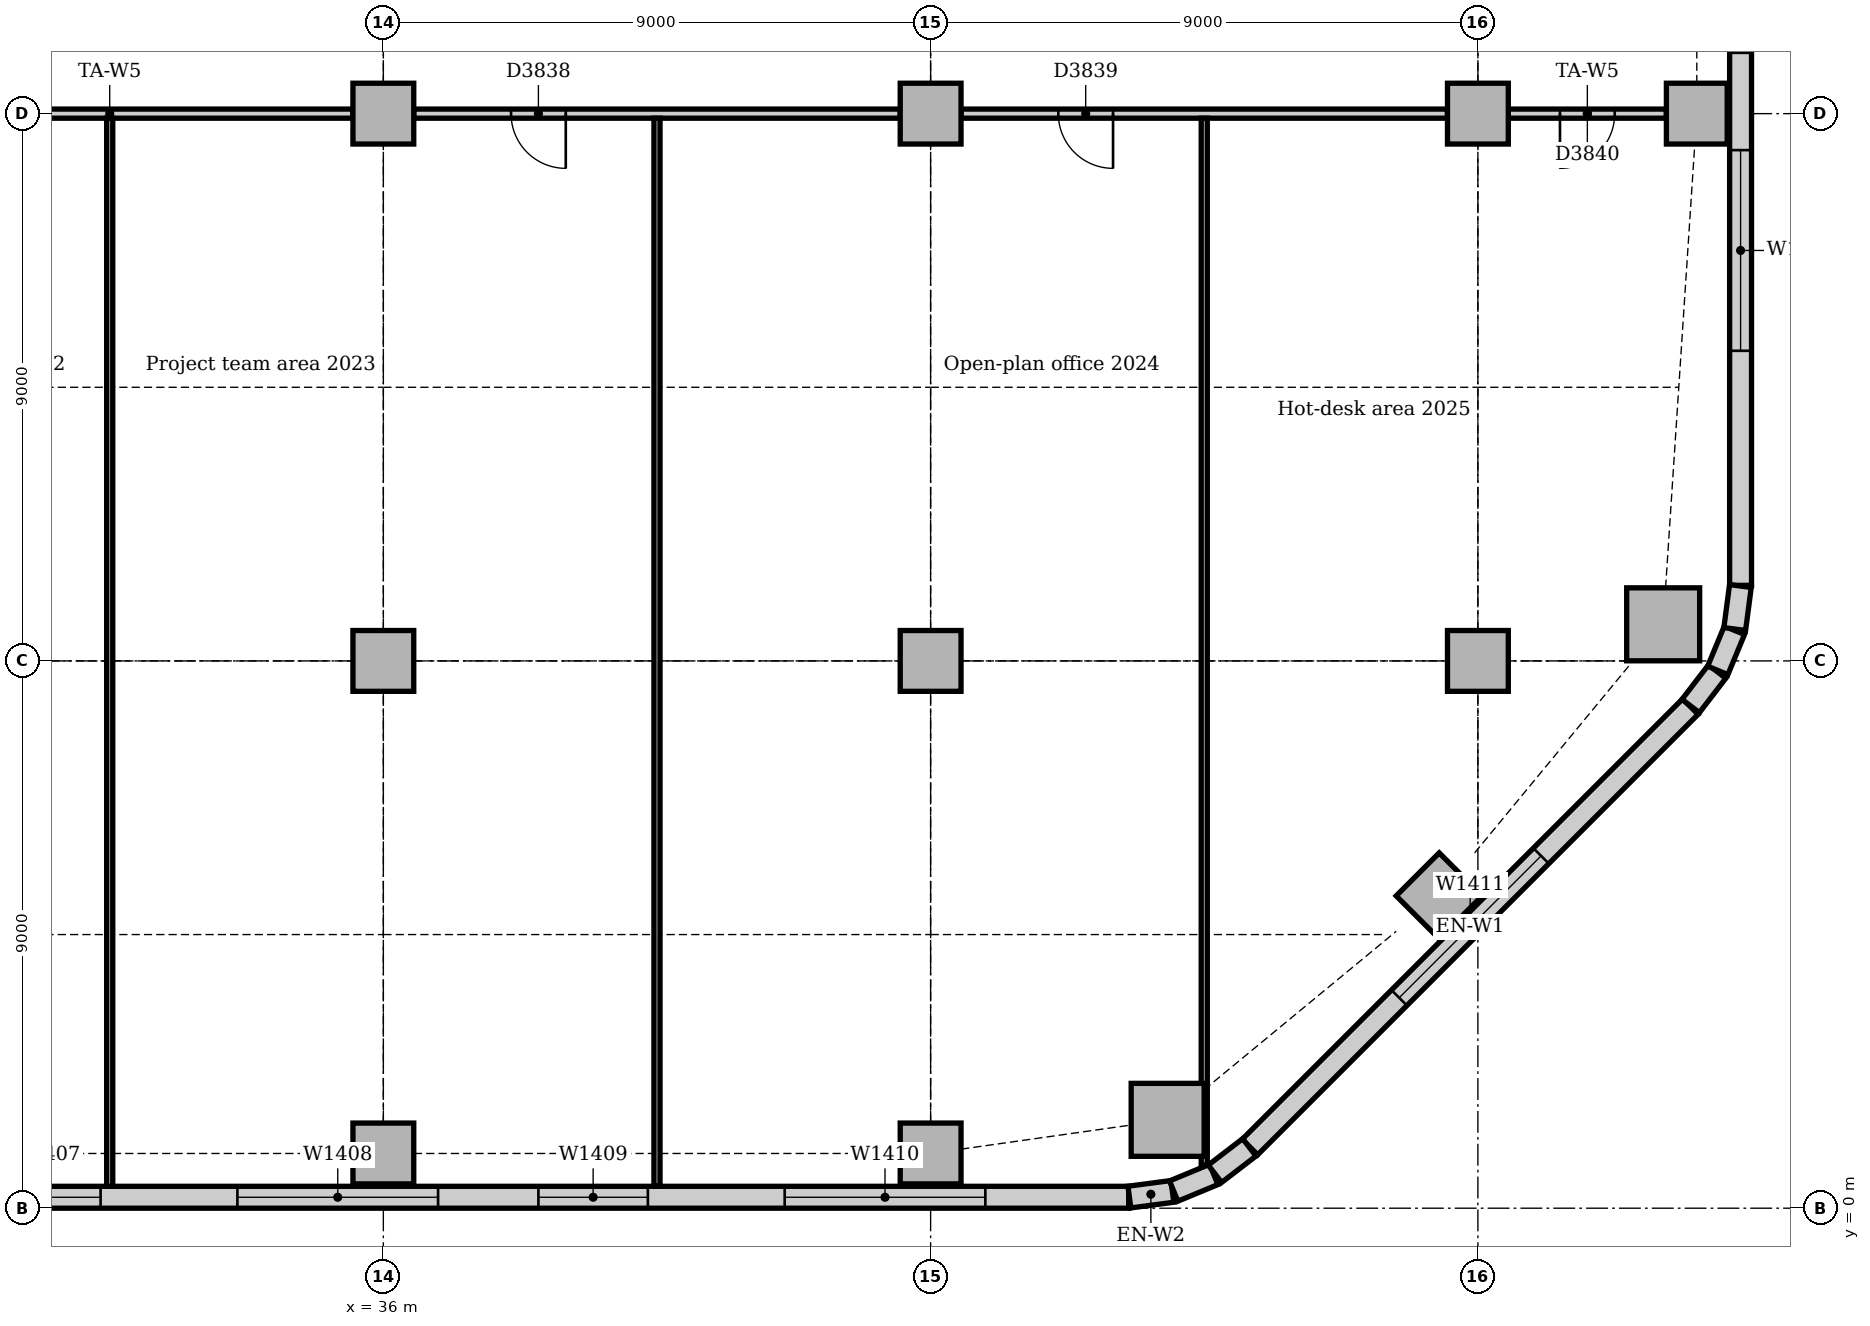
"""IFC4 building model, lengths in metres.
Left out: names, types, materials, properties, quantities, classifications, styles, units other than length and angle.
Written with IfcOpenShell. Run it as: python <this file> out.ifc"""

import sys

from ifc_helpers import new_model, si_unit, direction, frame, frame_2d, origin, origin_2d, place, context, subcontext, project, spatial, rectangle, extrude, element, fill, save


model = new_model("IFC4")
c1 = context("Model", 3, precision=1e-05, world=origin(), true_north=direction((0.0, 1.0)))
c2 = subcontext(c1, "Body", "Model", "MODEL_VIEW")
j1 = project(units=[si_unit("LENGTHUNIT", "METRE"), si_unit("PLANEANGLEUNIT", "RADIAN")], contexts=[c1])
p1 = place(None, origin())
s1 = spatial("IfcSite", under=j1, at=p1, CompositionType="ELEMENT")
p2 = place(p1, origin())
s2 = spatial("IfcBuilding", under=s1, at=p2, CompositionType="ELEMENT")
p3 = place(p2, frame((0.0, 0.0, 87.0)))
s3 = spatial("IfcBuildingStorey", under=s2, at=p3, CompositionType="ELEMENT", Elevation=87.0)
for number, where, z_axis, x_axis in (
    (1, (48.898, 1.453, 0.0), (0.0, 0.0, 1.0), (1.0, 0.0, 0.0)),
    (2, (57.047, 9.602, 0.0), (0.0, 0.0, 1.0), (1.0, 0.0, 0.0)),
):
    element("IfcColumn", number, at=place(p3, frame(where, z_axis=z_axis, x_axis=x_axis)), inside=s3, PredefinedType="COLUMN", context=c2, shape_type="SweptSolid", body=[
        extrude(rectangle(XDim=1.2, YDim=1.2, at=origin_2d()), origin(), (0.0, 0.0, 1.0), 3.85),
    ])
for number, where, z_axis, x_axis in (
    (3, (36.0, 0.9, 0.0), (0.0, 0.0, 1.0), (1.0, 0.0, 0.0)),
    (4, (45.0, 0.9, 0.0), (0.0, 0.0, 1.0), (1.0, 0.0, 0.0)),
    (5, (53.364, 5.136, 0.0), (0.0, 0.0, 1.0), (0.707, 0.707, 0.0)),
    (6, (57.6, 18.0, 0.0), (0.0, 0.0, 1.0), (1.0, 0.0, 0.0)),
    (7, (36.0, 9.0, 0.0), (0.0, 0.0, 1.0), (1.0, 0.0, 0.0)),
    (8, (36.0, 18.0, 0.0), (0.0, 0.0, 1.0), (1.0, 0.0, 0.0)),
    (9, (45.0, 9.0, 0.0), (0.0, 0.0, 1.0), (1.0, 0.0, 0.0)),
    (10, (45.0, 18.0, 0.0), (0.0, 0.0, 1.0), (1.0, 0.0, 0.0)),
    (11, (54.0, 9.0, 0.0), (0.0, 0.0, 1.0), (1.0, 0.0, 0.0)),
    (12, (54.0, 18.0, 0.0), (0.0, 0.0, 1.0), (1.0, 0.0, 0.0)),
):
    element("IfcColumn", number, at=place(p3, frame(where, z_axis=z_axis, x_axis=x_axis)), inside=s3, PredefinedType="COLUMN", context=c2, shape_type="SweptSolid", body=[
        extrude(rectangle(XDim=1.0, YDim=1.0, at=origin_2d()), origin(), (0.0, 0.0, 1.0), 3.85),
    ])
p4 = place(p3, frame((4.243, 0.18, 0.0), z_axis=(0.0, 0.0, 1.0), x_axis=(1.0, 0.0, 0.0)))
e13 = element("IfcWall", 13, at=p4, inside=s3, PredefinedType="STANDARD", context=c2, shape_type="SweptSolid", body=[
    extrude(rectangle(XDim=44.015, YDim=0.36, at=frame_2d((22.007, 0.0))), origin(), (0.0, 0.0, 1.0), 3.85),
])
p5 = place(p4, frame((2.357, 0.0, 0.9)))
e14 = element("IfcOpeningElement", 14, at=p5, cuts=e13, PredefinedType="OPENING", context=c2, shape_type="SweptSolid", body=[
    extrude(rectangle(XDim=3.3, YDim=1.6, at=frame_2d((1.65, 0.8))), frame((0.0, 0.19, 0.0), z_axis=(0.0, -1.0, 0.0), x_axis=(1.0, 0.0, 0.0)), (0.0, 0.0, 1.0), 0.38),
])
p6 = place(p4, frame((7.307, 0.0, 0.9)))
e15 = element("IfcOpeningElement", 15, at=p6, cuts=e13, PredefinedType="OPENING", context=c2, shape_type="SweptSolid", body=[
    extrude(rectangle(XDim=1.8, YDim=1.6, at=frame_2d((0.9, 0.8))), frame((0.0, 0.19, 0.0), z_axis=(0.0, -1.0, 0.0), x_axis=(1.0, 0.0, 0.0)), (0.0, 0.0, 1.0), 0.38),
])
p7 = place(p4, frame((11.357, 0.0, 0.9)))
e16 = element("IfcOpeningElement", 16, at=p7, cuts=e13, PredefinedType="OPENING", context=c2, shape_type="SweptSolid", body=[
    extrude(rectangle(XDim=3.3, YDim=1.6, at=frame_2d((1.65, 0.8))), frame((0.0, 0.19, 0.0), z_axis=(0.0, -1.0, 0.0), x_axis=(1.0, 0.0, 0.0)), (0.0, 0.0, 1.0), 0.38),
])
p8 = place(p4, frame((16.307, 0.0, 0.9)))
e17 = element("IfcOpeningElement", 17, at=p8, cuts=e13, PredefinedType="OPENING", context=c2, shape_type="SweptSolid", body=[
    extrude(rectangle(XDim=1.8, YDim=1.6, at=frame_2d((0.9, 0.8))), frame((0.0, 0.19, 0.0), z_axis=(0.0, -1.0, 0.0), x_axis=(1.0, 0.0, 0.0)), (0.0, 0.0, 1.0), 0.38),
])
p9 = place(p4, frame((20.357, 0.0, 0.9)))
e18 = element("IfcOpeningElement", 18, at=p9, cuts=e13, PredefinedType="OPENING", context=c2, shape_type="SweptSolid", body=[
    extrude(rectangle(XDim=3.3, YDim=1.6, at=frame_2d((1.65, 0.8))), frame((0.0, 0.19, 0.0), z_axis=(0.0, -1.0, 0.0), x_axis=(1.0, 0.0, 0.0)), (0.0, 0.0, 1.0), 0.38),
])
p10 = place(p4, frame((25.307, 0.0, 0.9)))
e19 = element("IfcOpeningElement", 19, at=p10, cuts=e13, PredefinedType="OPENING", context=c2, shape_type="SweptSolid", body=[
    extrude(rectangle(XDim=1.8, YDim=1.6, at=frame_2d((0.9, 0.8))), frame((0.0, 0.19, 0.0), z_axis=(0.0, -1.0, 0.0), x_axis=(1.0, 0.0, 0.0)), (0.0, 0.0, 1.0), 0.38),
])
p11 = place(p4, frame((29.357, 0.0, 0.9)))
e20 = element("IfcOpeningElement", 20, at=p11, cuts=e13, PredefinedType="OPENING", context=c2, shape_type="SweptSolid", body=[
    extrude(rectangle(XDim=3.3, YDim=1.6, at=frame_2d((1.65, 0.8))), frame((0.0, 0.19, 0.0), z_axis=(0.0, -1.0, 0.0), x_axis=(1.0, 0.0, 0.0)), (0.0, 0.0, 1.0), 0.38),
])
p12 = place(p4, frame((34.307, 0.0, 0.9)))
e21 = element("IfcOpeningElement", 21, at=p12, cuts=e13, PredefinedType="OPENING", context=c2, shape_type="SweptSolid", body=[
    extrude(rectangle(XDim=1.8, YDim=1.6, at=frame_2d((0.9, 0.8))), frame((0.0, 0.19, 0.0), z_axis=(0.0, -1.0, 0.0), x_axis=(1.0, 0.0, 0.0)), (0.0, 0.0, 1.0), 0.38),
])
p13 = place(p4, frame((38.357, 0.0, 0.9)))
e22 = element("IfcOpeningElement", 22, at=p13, cuts=e13, PredefinedType="OPENING", context=c2, shape_type="SweptSolid", body=[
    extrude(rectangle(XDim=3.3, YDim=1.6, at=frame_2d((1.65, 0.8))), frame((0.0, 0.19, 0.0), z_axis=(0.0, -1.0, 0.0), x_axis=(1.0, 0.0, 0.0)), (0.0, 0.0, 1.0), 0.38),
])
p14 = place(p3, frame((50.251, 1.006, 0.0), z_axis=(0.0, 0.0, 1.0), x_axis=(0.707106781187, 0.707106781187, 0.0)))
e23 = element("IfcWall", 23, at=p14, inside=s3, PredefinedType="STANDARD", context=c2, shape_type="SweptSolid", body=[
    extrude(rectangle(XDim=10.243, YDim=0.36, at=frame_2d((5.121, 0.0))), origin(), (0.0, 0.0, 1.0), 3.85),
])
p15 = place(p14, frame((3.471, 0.0, 0.9)))
e24 = element("IfcOpeningElement", 24, at=p15, cuts=e23, PredefinedType="OPENING", context=c2, shape_type="SweptSolid", body=[
    extrude(rectangle(XDim=3.3, YDim=1.6, at=frame_2d((1.65, 0.8))), frame((0.0, 0.19, 0.0), z_axis=(0.0, -1.0, 0.0), x_axis=(1.0, 0.0, 0.0)), (0.0, 0.0, 1.0), 0.38),
])
p16 = place(p3, frame((58.32, 10.243, 0.0), z_axis=(0.0, 0.0, 1.0), x_axis=(0.0, 1.0, 0.0)))
e25 = element("IfcWall", 25, at=p16, inside=s3, PredefinedType="STANDARD", context=c2, shape_type="SweptSolid", body=[
    extrude(rectangle(XDim=24.515, YDim=0.36, at=frame_2d((12.257, 0.0))), origin(), (0.0, 0.0, 1.0), 3.85),
])
p17 = place(p16, frame((3.857, 0.0, 0.9)))
e26 = element("IfcOpeningElement", 26, at=p17, cuts=e25, PredefinedType="OPENING", context=c2, shape_type="SweptSolid", body=[
    extrude(rectangle(XDim=3.3, YDim=1.6, at=frame_2d((1.65, 0.8))), frame((0.0, 0.19, 0.0), z_axis=(0.0, -1.0, 0.0), x_axis=(1.0, 0.0, 0.0)), (0.0, 0.0, 1.0), 0.38),
])
p18 = place(p16, frame((8.757, 0.0, 0.9)))
e27 = element("IfcOpeningElement", 27, at=p18, cuts=e25, PredefinedType="OPENING", context=c2, shape_type="SweptSolid", body=[
    extrude(rectangle(XDim=1.8, YDim=1.6, at=frame_2d((0.9, 0.8))), frame((0.0, 0.19, 0.0), z_axis=(0.0, -1.0, 0.0), x_axis=(1.0, 0.0, 0.0)), (0.0, 0.0, 1.0), 0.38),
])
p19 = place(p16, frame((12.857, 0.0, 0.9)))
e28 = element("IfcOpeningElement", 28, at=p19, cuts=e25, PredefinedType="OPENING", context=c2, shape_type="SweptSolid", body=[
    extrude(rectangle(XDim=3.3, YDim=1.6, at=frame_2d((1.65, 0.8))), frame((0.0, 0.19, 0.0), z_axis=(0.0, -1.0, 0.0), x_axis=(1.0, 0.0, 0.0)), (0.0, 0.0, 1.0), 0.38),
])
p20 = place(p16, frame((17.357, 0.0, 0.9)))
e29 = element("IfcOpeningElement", 29, at=p20, cuts=e25, PredefinedType="OPENING", context=c2, shape_type="SweptSolid", body=[
    extrude(rectangle(XDim=3.3, YDim=1.6, at=frame_2d((1.65, 0.8))), frame((0.0, 0.19, 0.0), z_axis=(0.0, -1.0, 0.0), x_axis=(1.0, 0.0, 0.0)), (0.0, 0.0, 1.0), 0.38),
])
for number, where, z_axis, x_axis in (
    (30, (48.269, 0.183, 0.0), (0.0, 0.0, 1.0), (0.991, 0.131, 0.0)),
    (31, (48.997, 0.282, 0.0), (0.0, 0.0, 1.0), (0.924, 0.383, 0.0)),
):
    element("IfcWall", number, at=place(p3, frame(where, z_axis=z_axis, x_axis=x_axis)), inside=s3, PredefinedType="STANDARD", context=c2, shape_type="SweptSolid", body=[
        extrude(rectangle(XDim=0.713, YDim=0.36, at=frame_2d((0.356, 0.0))), origin(), (0.0, 0.0, 1.0), 3.85),
    ])
for number, where, z_axis, x_axis in (
    (32, (49.675, 0.566, 0.0), (0.0, 0.0, 1.0), (0.793, 0.609, 0.0)),
    (33, (57.5, 8.259, 0.0), (0.0, 0.0, 1.0), (0.609, 0.793, 0.0)),
):
    element("IfcWall", number, at=place(p3, frame(where, z_axis=z_axis, x_axis=x_axis)), inside=s3, PredefinedType="STANDARD", context=c2, shape_type="SweptSolid", body=[
        extrude(rectangle(XDim=0.713, YDim=0.36, at=frame_2d((0.357, 0.0))), origin(), (0.0, 0.0, 1.0), 3.85),
    ])
for number, where, z_axis, x_axis in (
    (34, (57.945, 8.844, 0.0), (0.0, 0.0, 1.0), (0.383, 0.924, 0.0)),
    (35, (58.224, 9.524, 0.0), (0.0, 0.0, 1.0), (0.131, 0.991, 0.0)),
):
    element("IfcWall", number, at=place(p3, frame(where, z_axis=z_axis, x_axis=x_axis)), inside=s3, PredefinedType="STANDARD", context=c2, shape_type="SweptSolid", body=[
        extrude(rectangle(XDim=0.713, YDim=0.36, at=frame_2d((0.356, 0.0))), origin(), (0.0, 0.0, 1.0), 3.85),
    ])
p21 = place(p3, frame((54.5, 18.0, 0.0), z_axis=(0.0, 0.0, 1.0), x_axis=(1.0, 0.0, 0.0)))
e36 = element("IfcWall", 36, at=p21, inside=s3, PredefinedType="PARTITIONING", context=c2, shape_type="SweptSolid", body=[
    extrude(rectangle(XDim=2.6, YDim=0.15, at=frame_2d((1.3, 0.0))), origin(), (0.0, 0.0, 1.0), 3.602),
])
p22 = place(p21, frame((0.85, 0.0, 0.0)))
e37 = element("IfcOpeningElement", 37, at=p22, cuts=e36, PredefinedType="OPENING", context=c2, shape_type="SweptSolid", body=[
    extrude(rectangle(XDim=0.9, YDim=2.1, at=frame_2d((0.45, 1.05))), frame((0.0, 0.085, 0.0), z_axis=(0.0, -1.0, 0.0), x_axis=(1.0, 0.0, 0.0)), (0.0, 0.0, 1.0), 0.17),
])
p23 = place(p3, frame((45.5, 18.0, 0.0), z_axis=(0.0, 0.0, 1.0), x_axis=(1.0, 0.0, 0.0)))
e38 = element("IfcWall", 38, at=p23, inside=s3, PredefinedType="PARTITIONING", context=c2, shape_type="SweptSolid", body=[
    extrude(rectangle(XDim=8.0, YDim=0.15, at=frame_2d((4.0, 0.0))), origin(), (0.0, 0.0, 1.0), 3.15),
])
p24 = place(p23, frame((1.6, 0.0, 0.0)))
e39 = element("IfcOpeningElement", 39, at=p24, cuts=e38, PredefinedType="OPENING", context=c2, shape_type="SweptSolid", body=[
    extrude(rectangle(XDim=0.9, YDim=2.1, at=frame_2d((0.45, 1.05))), frame((0.0, 0.085, 0.0), z_axis=(0.0, -1.0, 0.0), x_axis=(1.0, 0.0, 0.0)), (0.0, 0.0, 1.0), 0.17),
])
p25 = place(p3, frame((36.5, 18.0, 0.0), z_axis=(0.0, 0.0, 1.0), x_axis=(1.0, 0.0, 0.0)))
e40 = element("IfcWall", 40, at=p25, inside=s3, PredefinedType="PARTITIONING", context=c2, shape_type="SweptSolid", body=[
    extrude(rectangle(XDim=8.0, YDim=0.15, at=frame_2d((4.0, 0.0))), origin(), (0.0, 0.0, 1.0), 3.15),
])
p26 = place(p25, frame((1.6, 0.0, 0.0)))
e41 = element("IfcOpeningElement", 41, at=p26, cuts=e40, PredefinedType="OPENING", context=c2, shape_type="SweptSolid", body=[
    extrude(rectangle(XDim=0.9, YDim=2.1, at=frame_2d((0.45, 1.05))), frame((0.0, 0.085, 0.0), z_axis=(0.0, -1.0, 0.0), x_axis=(1.0, 0.0, 0.0)), (0.0, 0.0, 1.0), 0.17),
])
p27 = place(p3, frame((27.5, 18.0, 0.0), z_axis=(0.0, 0.0, 1.0), x_axis=(1.0, 0.0, 0.0)))
e42 = element("IfcWall", 42, at=p27, inside=s3, PredefinedType="PARTITIONING", context=c2, shape_type="SweptSolid", body=[
    extrude(rectangle(XDim=8.0, YDim=0.15, at=frame_2d((4.0, 0.0))), origin(), (0.0, 0.0, 1.0), 3.15),
])
p28 = place(p27, frame((1.6, 0.0, 0.0)))
e43 = element("IfcOpeningElement", 43, at=p28, cuts=e42, PredefinedType="OPENING", context=c2, shape_type="SweptSolid", body=[
    extrude(rectangle(XDim=0.9, YDim=2.1, at=frame_2d((0.45, 1.05))), frame((0.0, 0.085, 0.0), z_axis=(0.0, -1.0, 0.0), x_axis=(1.0, 0.0, 0.0)), (0.0, 0.0, 1.0), 0.17),
])
for number, where, z_axis, x_axis in (
    (44, (31.5, 0.36, 0.0), (0.0, 0.0, 1.0), (0.0, 1.0, 0.0)),
    (45, (40.5, 0.36, 0.0), (0.0, 0.0, 1.0), (0.0, 1.0, 0.0)),
):
    element("IfcWall", number, at=place(p3, frame(where, z_axis=z_axis, x_axis=x_axis)), inside=s3, PredefinedType="PARTITIONING", context=c2, shape_type="SweptSolid", body=[
        extrude(rectangle(XDim=17.565, YDim=0.1, at=frame_2d((8.783, 0.0))), origin(), (0.0, 0.0, 1.0), 3.85),
    ])
p29 = place(p3, frame((49.5, 0.706, 0.0), z_axis=(0.0, 0.0, 1.0), x_axis=(0.0, 1.0, 0.0)))
e46 = element("IfcWall", 46, at=p29, inside=s3, PredefinedType="PARTITIONING", context=c2, shape_type="SweptSolid", body=[
    extrude(rectangle(XDim=17.219, YDim=0.1, at=frame_2d((8.61, 0.0))), origin(), (0.0, 0.0, 1.0), 3.85),
])
p30 = place(p10, origin())
e47 = element("IfcWindow", 47, at=p30, inside=s3, PartitioningType="SINGLE_PANEL", PredefinedType="WINDOW", context=c2, shape_type="SweptSolid", body=[
    extrude(rectangle(XDim=1.8, YDim=1.6, at=frame_2d((0.9, 0.8))), frame((0.0, 0.13, 0.0), z_axis=(0.0, -1.0, 0.0), x_axis=(1.0, 0.0, 0.0)), (0.0, 0.0, 1.0), 0.06),
])
fill(e19, e47)
p31 = place(p11, origin())
e48 = element("IfcWindow", 48, at=p31, inside=s3, PartitioningType="SINGLE_PANEL", PredefinedType="WINDOW", context=c2, shape_type="SweptSolid", body=[
    extrude(rectangle(XDim=3.3, YDim=1.6, at=frame_2d((1.65, 0.8))), frame((0.0, 0.13, 0.0), z_axis=(0.0, -1.0, 0.0), x_axis=(1.0, 0.0, 0.0)), (0.0, 0.0, 1.0), 0.06),
])
fill(e20, e48)
p32 = place(p12, origin())
e49 = element("IfcWindow", 49, at=p32, inside=s3, PartitioningType="SINGLE_PANEL", PredefinedType="WINDOW", context=c2, shape_type="SweptSolid", body=[
    extrude(rectangle(XDim=1.8, YDim=1.6, at=frame_2d((0.9, 0.8))), frame((0.0, 0.13, 0.0), z_axis=(0.0, -1.0, 0.0), x_axis=(1.0, 0.0, 0.0)), (0.0, 0.0, 1.0), 0.06),
])
fill(e21, e49)
p33 = place(p13, origin())
e50 = element("IfcWindow", 50, at=p33, inside=s3, PartitioningType="SINGLE_PANEL", PredefinedType="WINDOW", context=c2, shape_type="SweptSolid", body=[
    extrude(rectangle(XDim=3.3, YDim=1.6, at=frame_2d((1.65, 0.8))), frame((0.0, 0.13, 0.0), z_axis=(0.0, -1.0, 0.0), x_axis=(1.0, 0.0, 0.0)), (0.0, 0.0, 1.0), 0.06),
])
fill(e22, e50)
p34 = place(p15, origin())
e51 = element("IfcWindow", 51, at=p34, inside=s3, PartitioningType="SINGLE_PANEL", PredefinedType="WINDOW", context=c2, shape_type="SweptSolid", body=[
    extrude(rectangle(XDim=3.3, YDim=1.6, at=frame_2d((1.65, 0.8))), frame((0.0, 0.13, 0.0), z_axis=(0.0, -1.0, 0.0), x_axis=(1.0, 0.0, 0.0)), (0.0, 0.0, 1.0), 0.06),
])
fill(e24, e51)
p35 = place(p17, origin())
e52 = element("IfcWindow", 52, at=p35, inside=s3, PartitioningType="SINGLE_PANEL", PredefinedType="WINDOW", context=c2, shape_type="SweptSolid", body=[
    extrude(rectangle(XDim=3.3, YDim=1.6, at=frame_2d((1.65, 0.8))), frame((0.0, 0.13, 0.0), z_axis=(0.0, -1.0, 0.0), x_axis=(1.0, 0.0, 0.0)), (0.0, 0.0, 1.0), 0.06),
])
fill(e26, e52)
p36 = place(p26, frame((0.9, 0.0, 0.0), z_axis=(0.0, 0.0, 1.0), x_axis=(-1.0, 0.0, 0.0)))
e53 = element("IfcDoor", 53, at=p36, inside=s3, OperationType="SINGLE_SWING_LEFT", PredefinedType="DOOR", context=c2, shape_type="SweptSolid", body=[
    extrude(rectangle(XDim=0.9, YDim=2.1, at=frame_2d((0.45, 1.05))), frame((0.0, 0.025, 0.0), z_axis=(0.0, -1.0, 0.0), x_axis=(1.0, 0.0, 0.0)), (0.0, 0.0, 1.0), 0.05),
])
fill(e41, e53)
p37 = place(p24, frame((0.9, 0.0, 0.0), z_axis=(0.0, 0.0, 1.0), x_axis=(-1.0, 0.0, 0.0)))
e54 = element("IfcDoor", 54, at=p37, inside=s3, OperationType="SINGLE_SWING_LEFT", PredefinedType="DOOR", context=c2, shape_type="SweptSolid", body=[
    extrude(rectangle(XDim=0.9, YDim=2.1, at=frame_2d((0.45, 1.05))), frame((0.0, 0.025, 0.0), z_axis=(0.0, -1.0, 0.0), x_axis=(1.0, 0.0, 0.0)), (0.0, 0.0, 1.0), 0.05),
])
fill(e39, e54)
p38 = place(p22, frame((0.9, 0.0, 0.0), z_axis=(0.0, 0.0, 1.0), x_axis=(-1.0, 0.0, 0.0)))
e55 = element("IfcDoor", 55, at=p38, inside=s3, OperationType="SINGLE_SWING_RIGHT", PredefinedType="DOOR", context=c2, shape_type="SweptSolid", body=[
    extrude(rectangle(XDim=0.9, YDim=2.1, at=frame_2d((0.45, 1.05))), frame((0.0, 0.025, 0.0), z_axis=(0.0, -1.0, 0.0), x_axis=(1.0, 0.0, 0.0)), (0.0, 0.0, 1.0), 0.05),
])
fill(e37, e55)
save(model, sys.argv[1])
